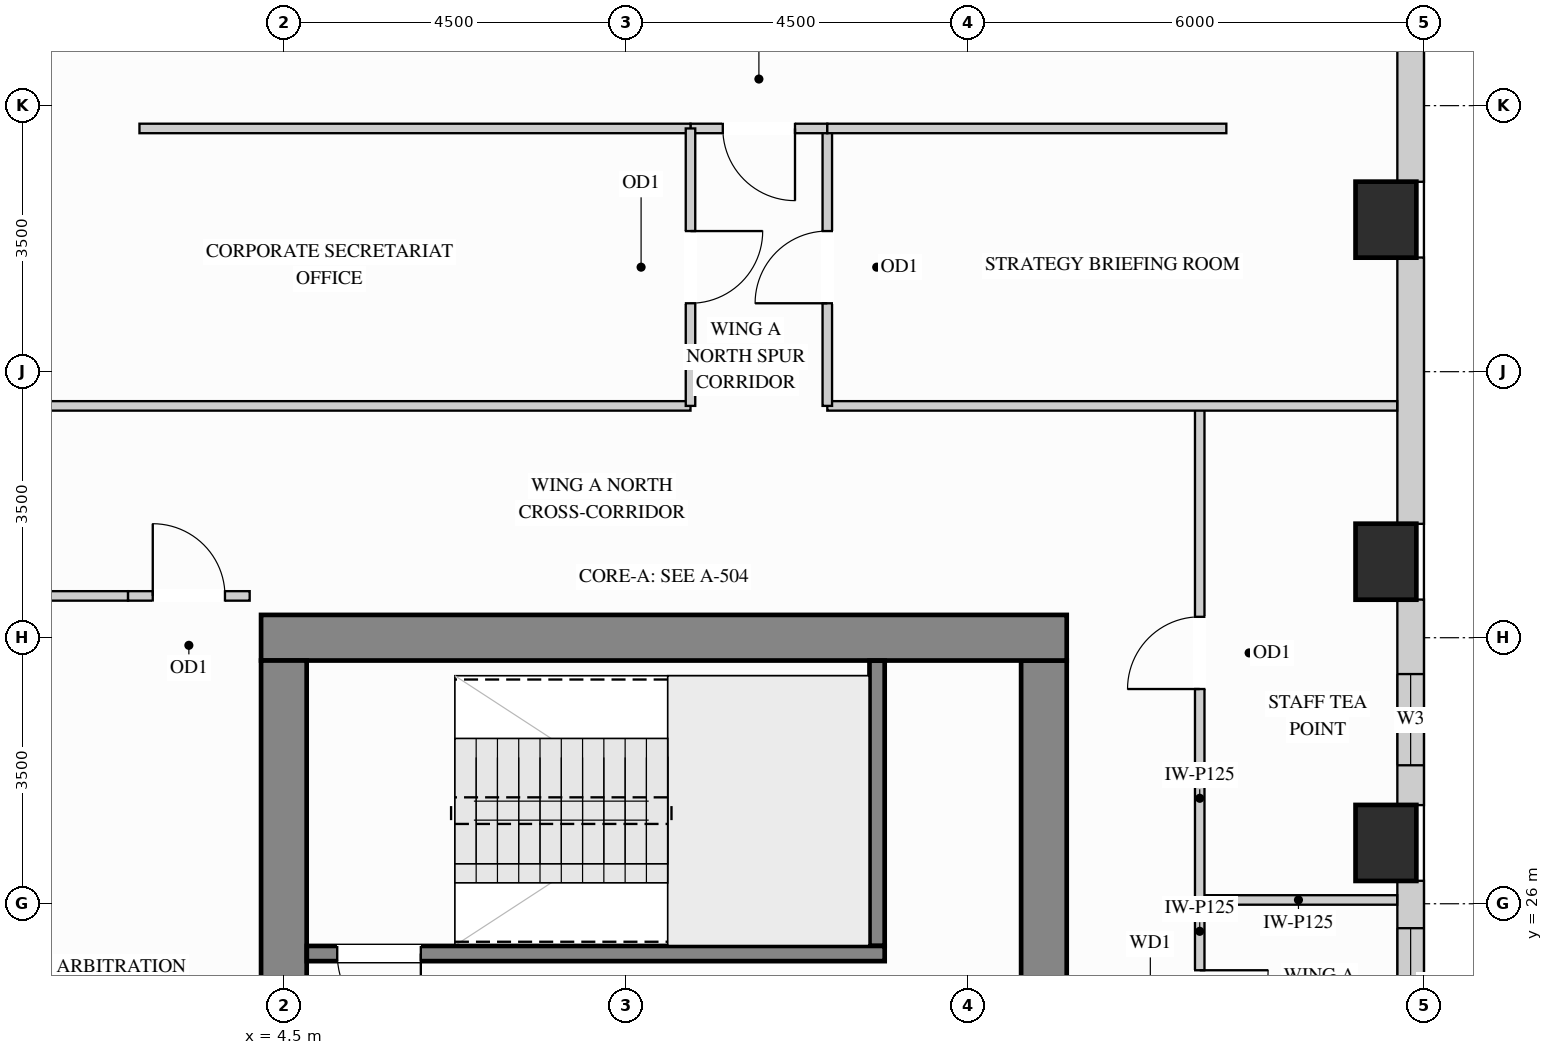
"""IFC4 building model, lengths in metres.
Left out: names, types, materials, properties, quantities, classifications, styles, units other than length and angle.
Written with IfcOpenShell. Run it as: python <this file> out.ifc"""

import sys

from ifc_helpers import new_model, si_unit, direction, frame, frame_2d, origin, origin_2d, place, context, subcontext, project, spatial, rectangle, extrude, source, transform, mapped, element, fill, save


model = new_model("IFC4")
c1 = context("Model", 3, precision=1e-05, world=origin(), true_north=direction((0.0, 1.0)))
c2 = subcontext(c1, "Body", "Model", "MODEL_VIEW")
j1 = project(units=[si_unit("LENGTHUNIT", "METRE"), si_unit("PLANEANGLEUNIT", "RADIAN")], contexts=[c1])
p1 = place(None, origin())
s1 = spatial("IfcSite", under=j1, at=p1, CompositionType="ELEMENT")
p2 = place(p1, origin())
s2 = spatial("IfcBuilding", under=s1, at=p2, CompositionType="ELEMENT")
p3 = place(p2, frame((0.0, 0.0, 153.9)))
s3 = spatial("IfcBuildingStorey", under=s2, at=p3, CompositionType="ELEMENT", Elevation=153.9)
m1 = source(origin(), c2, "Body", "SweptSolid", [
    extrude(rectangle(XDim=0.8, YDim=1.0, at=origin_2d()), origin(), (0.0, 0.0, 1.0), 3.4),
])
for number, where, z_axis, x_axis in (
    (1, (19.0, 26.8, 0.0), (0.0, 0.0, 1.0), (1.0, 0.0, 0.0)),
    (2, (19.0, 30.5, 0.0), (0.0, 0.0, 1.0), (1.0, 0.0, 0.0)),
    (3, (19.0, 35.0, 0.0), (0.0, 0.0, 1.0), (1.0, 0.0, 0.0)),
):
    element("IfcColumn", number, at=place(p3, frame(where, z_axis=z_axis, x_axis=x_axis)), inside=s3, PredefinedType="COLUMN", context=c2, shape_type="MappedRepresentation", body=[
        mapped(m1, transform((0.0, 0.0, 0.0), x_axis=(1.0, 0.0, 0.0), y_axis=(0.0, 1.0, 0.0), z_axis=(0.0, 0.0, 1.0))),
    ])
m2 = source(origin(), c2, "Body", "SweptSolid", [
    extrude(rectangle(XDim=8.32, YDim=0.6, at=frame_2d((4.16, 0.0))), origin(), (0.0, 0.0, 1.0), 3.4),
])
p4 = place(p3, frame((14.5, 20.88, 0.0), z_axis=(0.0, 0.0, 1.0), x_axis=(0.0, 1.0, 0.0)))
e4 = element("IfcWall", 4, at=p4, inside=s3, PredefinedType="SHEAR", context=c2, shape_type="MappedRepresentation", body=[
    mapped(m2, transform((0.0, 0.0, 0.0), x_axis=(1.0, 0.0, 0.0), y_axis=(0.0, 1.0, 0.0), z_axis=(0.0, 0.0, 1.0))),
])
m3 = source(origin(), c2, "Body", "SweptSolid", [
    extrude(rectangle(XDim=10.6, YDim=0.6, at=frame_2d((5.3, 0.0))), origin(), (0.0, 0.0, 1.0), 3.4),
])
p5 = place(p3, frame((4.2, 29.5, 0.0), z_axis=(0.0, 0.0, 1.0), x_axis=(1.0, 0.0, 0.0)))
e5 = element("IfcWall", 5, at=p5, inside=s3, PredefinedType="SHEAR", context=c2, shape_type="MappedRepresentation", body=[
    mapped(m3, transform((0.0, 0.0, 0.0), x_axis=(1.0, 0.0, 0.0), y_axis=(0.0, 1.0, 0.0), z_axis=(0.0, 0.0, 1.0))),
])
m4 = source(origin(), c2, "Body", "SweptSolid", [
    extrude(rectangle(XDim=20.4, YDim=0.6, at=frame_2d((10.2, 0.0))), origin(), (0.0, 0.0, 1.0), 3.4),
])
p6 = place(p3, frame((4.5, 8.8, 0.0), z_axis=(0.0, 0.0, 1.0), x_axis=(0.0, 1.0, 0.0)))
e6 = element("IfcWall", 6, at=p6, inside=s3, PredefinedType="SHEAR", context=c2, shape_type="MappedRepresentation", body=[
    mapped(m4, transform((0.0, 0.0, 0.0), x_axis=(1.0, 0.0, 0.0), y_axis=(0.0, 1.0, 0.0), z_axis=(0.0, 0.0, 1.0))),
])
p7 = place(p3, frame((19.325, 22.998, 0.0), z_axis=(0.0, 0.0, 1.0), x_axis=(0.0, 1.0, 0.0)))
e7 = element("IfcWall", 7, at=p7, inside=s3, PredefinedType="SOLIDWALL", context=c2, shape_type="SweptSolid", body=[
    extrude(rectangle(XDim=3.304, YDim=0.35, at=frame_2d((1.652, 0.0))), origin(), (0.0, 0.0, 1.0), 2.612),
])
p8 = place(p7, frame((1.18, 0.0, 0.78)))
e8 = element("IfcOpeningElement", 8, at=p8, cuts=e7, PredefinedType="OPENING", context=c2, shape_type="SweptSolid", body=[
    extrude(rectangle(XDim=1.5, YDim=1.652, at=frame_2d((0.75, 0.826))), frame((0.0, 0.185, 0.0), z_axis=(0.0, -1.0, 0.0), x_axis=(1.0, 0.0, 0.0)), (0.0, 0.0, 1.0), 0.37),
])
p9 = place(p3, frame((19.325, 27.298, 0.0), z_axis=(0.0, 0.0, 1.0), x_axis=(0.0, 1.0, 0.0)))
e9 = element("IfcWall", 9, at=p9, inside=s3, PredefinedType="SOLIDWALL", context=c2, shape_type="SweptSolid", body=[
    extrude(rectangle(XDim=2.704, YDim=0.35, at=frame_2d((1.352, 0.0))), origin(), (0.0, 0.0, 1.0), 2.612),
])
p10 = place(p9, frame((0.524, 0.0, 0.78)))
e10 = element("IfcOpeningElement", 10, at=p10, cuts=e9, PredefinedType="OPENING", context=c2, shape_type="SweptSolid", body=[
    extrude(rectangle(XDim=1.2, YDim=1.652, at=frame_2d((0.6, 0.826))), frame((0.0, 0.185, 0.0), z_axis=(0.0, -1.0, 0.0), x_axis=(1.0, 0.0, 0.0)), (0.0, 0.0, 1.0), 0.37),
])
m5 = source(origin(), c2, "Body", "SweptSolid", [
    extrude(rectangle(XDim=3.504, YDim=0.35, at=frame_2d((1.752, 0.0))), origin(), (0.0, 0.0, 1.0), 2.612),
])
p11 = place(p3, frame((19.325, 30.998, 0.0), z_axis=(0.0, 0.0, 1.0), x_axis=(0.0, 1.0, 0.0)))
e11 = element("IfcWall", 11, at=p11, inside=s3, PredefinedType="SOLIDWALL", context=c2, shape_type="MappedRepresentation", body=[
    mapped(m5, transform((0.0, 0.0, 0.0), x_axis=(1.0, 0.0, 0.0), y_axis=(0.0, 1.0, 0.0), z_axis=(0.0, 0.0, 1.0))),
])
m6 = source(origin(), c2, "Body", "SweptSolid", [
    extrude(rectangle(XDim=1.904, YDim=0.35, at=frame_2d((0.952, 0.0))), origin(), (0.0, 0.0, 1.0), 2.612),
])
p12 = place(p3, frame((19.325, 35.498, 0.0), z_axis=(0.0, 0.0, 1.0), x_axis=(0.0, 1.0, 0.0)))
e12 = element("IfcWall", 12, at=p12, inside=s3, PredefinedType="SOLIDWALL", context=c2, shape_type="MappedRepresentation", body=[
    mapped(m6, transform((0.0, 0.0, 0.0), x_axis=(1.0, 0.0, 0.0), y_axis=(0.0, 1.0, 0.0), z_axis=(0.0, 0.0, 1.0))),
])
m7 = source(origin(), c2, "Body", "SweptSolid", [
    extrude(rectangle(XDim=2.598, YDim=0.125, at=frame_2d((1.299, 0.0))), origin(), (0.0, 0.0, 1.0), 3.385),
])
p13 = place(p3, frame((16.55, 26.05, 0.0), z_axis=(0.0, 0.0, 1.0), x_axis=(1.0, 0.0, 0.0)))
e13 = element("IfcWall", 13, at=p13, inside=s3, PredefinedType="PARTITIONING", context=c2, shape_type="MappedRepresentation", body=[
    mapped(m7, transform((0.0, 0.0, 0.0), x_axis=(1.0, 0.0, 0.0), y_axis=(0.0, 1.0, 0.0), z_axis=(0.0, 0.0, 1.0))),
])
p14 = place(p3, frame((16.55, 26.05, 0.0), z_axis=(0.0, 0.0, 1.0), x_axis=(0.0, 1.0, 0.0)))
e14 = element("IfcWall", 14, at=p14, inside=s3, PredefinedType="PARTITIONING", context=c2, shape_type="SweptSolid", body=[
    extrude(rectangle(XDim=6.5, YDim=0.125, at=frame_2d((3.25, 0.0))), origin(), (0.0, 0.0, 1.0), 3.385),
])
p15 = place(p14, frame((2.775, 0.0, 0.0)))
e15 = element("IfcOpeningElement", 15, at=p15, cuts=e14, PredefinedType="OPENING", context=c2, shape_type="SweptSolid", body=[
    extrude(rectangle(XDim=0.95, YDim=2.15, at=frame_2d((0.475, 1.075))), frame((0.0, 0.073, 0.0), z_axis=(0.0, -1.0, 0.0), x_axis=(1.0, 0.0, 0.0)), (0.0, 0.0, 1.0), 0.145),
])
p16 = place(p3, frame((16.55, 23.35, 0.0), z_axis=(0.0, 0.0, 1.0), x_axis=(0.0, 1.0, 0.0)))
e16 = element("IfcWall", 16, at=p16, inside=s3, PredefinedType="PARTITIONING", context=c2, shape_type="SweptSolid", body=[
    extrude(rectangle(XDim=2.7, YDim=0.125, at=frame_2d((1.35, 0.0))), origin(), (0.0, 0.0, 1.0), 3.385),
])
p17 = place(p16, frame((0.875, 0.0, 0.0)))
e17 = element("IfcOpeningElement", 17, at=p17, cuts=e16, PredefinedType="OPENING", context=c2, shape_type="SweptSolid", body=[
    extrude(rectangle(XDim=0.9, YDim=2.15, at=frame_2d((0.45, 1.075))), frame((0.0, 0.073, 0.0), z_axis=(0.0, -1.0, 0.0), x_axis=(1.0, 0.0, 0.0)), (0.0, 0.0, 1.0), 0.145),
])
m8 = source(origin(), c2, "Body", "SweptSolid", [
    extrude(rectangle(XDim=7.498, YDim=0.125, at=frame_2d((3.749, 0.0))), origin(), (0.0, 0.0, 1.0), 3.385),
])
p18 = place(p3, frame((11.65, 32.55, 0.0), z_axis=(0.0, 0.0, 1.0), x_axis=(1.0, 0.0, 0.0)))
e18 = element("IfcWall", 18, at=p18, inside=s3, PredefinedType="PARTITIONING", context=c2, shape_type="MappedRepresentation", body=[
    mapped(m8, transform((0.0, 0.0, 0.0), x_axis=(1.0, 0.0, 0.0), y_axis=(0.0, 1.0, 0.0), z_axis=(0.0, 0.0, 1.0))),
])
m9 = source(origin(), c2, "Body", "SweptSolid", [
    extrude(rectangle(XDim=9.498, YDim=0.125, at=frame_2d((4.749, 0.0))), origin(), (0.0, 0.0, 1.0), 3.385),
])
p19 = place(p3, frame((0.352, 32.55, 0.0), z_axis=(0.0, 0.0, 1.0), x_axis=(1.0, 0.0, 0.0)))
e19 = element("IfcWall", 19, at=p19, inside=s3, PredefinedType="PARTITIONING", context=c2, shape_type="MappedRepresentation", body=[
    mapped(m9, transform((0.0, 0.0, 0.0), x_axis=(1.0, 0.0, 0.0), y_axis=(0.0, 1.0, 0.0), z_axis=(0.0, 0.0, 1.0))),
])
m10 = source(origin(), c2, "Body", "SweptSolid", [
    extrude(rectangle(XDim=1.33, YDim=0.125, at=frame_2d((0.665, 0.0))), origin(), (0.0, 0.0, 1.0), 3.385),
])
p20 = place(p3, frame((1.12, 30.05, 0.0), z_axis=(0.0, 0.0, 1.0), x_axis=(1.0, 0.0, 0.0)))
e20 = element("IfcWall", 20, at=p20, inside=s3, PredefinedType="PARTITIONING", context=c2, shape_type="MappedRepresentation", body=[
    mapped(m10, transform((0.0, 0.0, 0.0), x_axis=(1.0, 0.0, 0.0), y_axis=(0.0, 1.0, 0.0), z_axis=(0.0, 0.0, 1.0))),
])
p21 = place(p3, frame((2.45, 30.05, 0.0), z_axis=(0.0, 0.0, 1.0), x_axis=(1.0, 0.0, 0.0)))
e21 = element("IfcWall", 21, at=p21, inside=s3, PredefinedType="PARTITIONING", context=c2, shape_type="SweptSolid", body=[
    extrude(rectangle(XDim=1.6, YDim=0.125, at=frame_2d((0.8, 0.0))), origin(), (0.0, 0.0, 1.0), 3.385),
])
p22 = place(p21, frame((0.325, 0.0, 0.0)))
e22 = element("IfcOpeningElement", 22, at=p22, cuts=e21, PredefinedType="OPENING", context=c2, shape_type="SweptSolid", body=[
    extrude(rectangle(XDim=0.95, YDim=2.15, at=frame_2d((0.475, 1.075))), frame((0.0, 0.073, 0.0), z_axis=(0.0, -1.0, 0.0), x_axis=(1.0, 0.0, 0.0)), (0.0, 0.0, 1.0), 0.145),
])
p23 = place(p3, frame((11.65, 32.55, 0.0), z_axis=(0.0, 0.0, 1.0), x_axis=(0.0, 1.0, 0.0)))
e23 = element("IfcWall", 23, at=p23, inside=s3, PredefinedType="PARTITIONING", context=c2, shape_type="SweptSolid", body=[
    extrude(rectangle(XDim=3.65, YDim=0.125, at=frame_2d((1.825, 0.0))), origin(), (0.0, 0.0, 1.0), 3.385),
])
p24 = place(p23, frame((1.35, 0.0, 0.0)))
e24 = element("IfcOpeningElement", 24, at=p24, cuts=e23, PredefinedType="OPENING", context=c2, shape_type="SweptSolid", body=[
    extrude(rectangle(XDim=0.95, YDim=2.15, at=frame_2d((0.475, 1.075))), frame((0.0, 0.073, 0.0), z_axis=(0.0, -1.0, 0.0), x_axis=(1.0, 0.0, 0.0)), (0.0, 0.0, 1.0), 0.145),
])
p25 = place(p3, frame((9.85, 36.2, 0.0), z_axis=(0.0, 0.0, 1.0), x_axis=(1.0, 0.0, 0.0)))
e25 = element("IfcWall", 25, at=p25, inside=s3, PredefinedType="PARTITIONING", context=c2, shape_type="SweptSolid", body=[
    extrude(rectangle(XDim=1.8, YDim=0.125, at=frame_2d((0.9, 0.0))), origin(), (0.0, 0.0, 1.0), 2.848),
])
p26 = place(p25, frame((0.425, 0.0, 0.0)))
e26 = element("IfcOpeningElement", 26, at=p26, cuts=e25, PredefinedType="OPENING", context=c2, shape_type="SweptSolid", body=[
    extrude(rectangle(XDim=0.95, YDim=2.15, at=frame_2d((0.475, 1.075))), frame((0.0, 0.073, 0.0), z_axis=(0.0, -1.0, 0.0), x_axis=(1.0, 0.0, 0.0)), (0.0, 0.0, 1.0), 0.145),
])
m11 = source(origin(), c2, "Body", "SweptSolid", [
    extrude(rectangle(XDim=5.25, YDim=0.125, at=frame_2d((2.625, 0.0))), origin(), (0.0, 0.0, 1.0), 2.848),
])
p27 = place(p3, frame((11.65, 36.2, 0.0), z_axis=(0.0, 0.0, 1.0), x_axis=(1.0, 0.0, 0.0)))
e27 = element("IfcWall", 27, at=p27, inside=s3, PredefinedType="PARTITIONING", context=c2, shape_type="MappedRepresentation", body=[
    mapped(m11, transform((0.0, 0.0, 0.0), x_axis=(1.0, 0.0, 0.0), y_axis=(0.0, 1.0, 0.0), z_axis=(0.0, 0.0, 1.0))),
])
m12 = source(origin(), c2, "Body", "SweptSolid", [
    extrude(rectangle(XDim=7.25, YDim=0.125, at=frame_2d((3.625, 0.0))), origin(), (0.0, 0.0, 1.0), 2.848),
])
p28 = place(p3, frame((2.6, 36.2, 0.0), z_axis=(0.0, 0.0, 1.0), x_axis=(1.0, 0.0, 0.0)))
e28 = element("IfcWall", 28, at=p28, inside=s3, PredefinedType="PARTITIONING", context=c2, shape_type="MappedRepresentation", body=[
    mapped(m12, transform((0.0, 0.0, 0.0), x_axis=(1.0, 0.0, 0.0), y_axis=(0.0, 1.0, 0.0), z_axis=(0.0, 0.0, 1.0))),
])
p29 = place(p3, frame((9.85, 32.55, 0.0), z_axis=(0.0, 0.0, 1.0), x_axis=(0.0, 1.0, 0.0)))
e29 = element("IfcWall", 29, at=p29, inside=s3, PredefinedType="PARTITIONING", context=c2, shape_type="SweptSolid", body=[
    extrude(rectangle(XDim=3.65, YDim=0.125, at=frame_2d((1.825, 0.0))), origin(), (0.0, 0.0, 1.0), 3.385),
])
p30 = place(p29, frame((1.35, 0.0, 0.0)))
e30 = element("IfcOpeningElement", 30, at=p30, cuts=e29, PredefinedType="OPENING", context=c2, shape_type="SweptSolid", body=[
    extrude(rectangle(XDim=0.95, YDim=2.15, at=frame_2d((0.475, 1.075))), frame((0.0, 0.073, 0.0), z_axis=(0.0, -1.0, 0.0), x_axis=(1.0, 0.0, 0.0)), (0.0, 0.0, 1.0), 0.145),
])
m13 = source(origin(), c2, "Body", "SweptSolid", [
    extrude(rectangle(XDim=3.753, YDim=0.2, at=frame_2d((1.876, 0.0))), origin(), (0.0, 0.0, 1.0), 3.4),
])
p31 = place(p3, frame((12.305, 25.445, 0.0), z_axis=(0.0, 0.0, 1.0), x_axis=(0.0, 1.0, 0.0)))
e31 = element("IfcWall", 31, at=p31, inside=s3, PredefinedType="SHEAR", context=c2, shape_type="MappedRepresentation", body=[
    mapped(m13, transform((0.0, 0.0, 0.0), x_axis=(1.0, 0.0, 0.0), y_axis=(0.0, 1.0, 0.0), z_axis=(0.0, 0.0, 1.0))),
])
p32 = place(p3, frame((4.802, 25.345, 0.0), z_axis=(0.0, 0.0, 1.0), x_axis=(1.0, 0.0, 0.0)))
e32 = element("IfcWall", 32, at=p32, inside=s3, PredefinedType="SHEAR", context=c2, shape_type="SweptSolid", body=[
    extrude(rectangle(XDim=7.603, YDim=0.2, at=frame_2d((3.802, 0.0))), origin(), (0.0, 0.0, 1.0), 3.4),
])
p33 = place(p32, frame((0.4, 0.0, 0.0)))
e33 = element("IfcOpeningElement", 33, at=p33, cuts=e32, PredefinedType="OPENING", context=c2, shape_type="SweptSolid", body=[
    extrude(rectangle(XDim=1.1, YDim=2.15, at=frame_2d((0.55, 1.075))), frame((0.0, 0.11, 0.0), z_axis=(0.0, -1.0, 0.0), x_axis=(1.0, 0.0, 0.0)), (0.0, 0.0, 1.0), 0.22),
])
m14 = source(origin(), c2, "Body", "SweptSolid", [
    extrude(rectangle(XDim=0.95, YDim=2.15, at=frame_2d((0.475, 1.075))), frame((0.0, 0.025, 0.0), z_axis=(0.0, -1.0, 0.0), x_axis=(1.0, 0.0, 0.0)), (0.0, 0.0, 1.0), 0.05),
])
p34 = place(p15, origin())
e34 = element("IfcDoor", 34, at=p34, inside=s3, OperationType="SINGLE_SWING_LEFT", PredefinedType="DOOR", context=c2, shape_type="MappedRepresentation", body=[
    mapped(m14, transform((0.0, 0.0, 0.0), x_axis=(1.0, 0.0, 0.0), y_axis=(0.0, 1.0, 0.0), z_axis=(0.0, 0.0, 1.0))),
])
fill(e15, e34)
p35 = place(p24, origin())
e35 = element("IfcDoor", 35, at=p35, inside=s3, OperationType="SINGLE_SWING_LEFT", PredefinedType="DOOR", context=c2, shape_type="MappedRepresentation", body=[
    mapped(m14, transform((0.0, 0.0, 0.0), x_axis=(1.0, 0.0, 0.0), y_axis=(0.0, 1.0, 0.0), z_axis=(0.0, 0.0, 1.0))),
])
fill(e24, e35)
p36 = place(p26, origin())
e36 = element("IfcDoor", 36, at=p36, inside=s3, OperationType="SINGLE_SWING_RIGHT", PredefinedType="DOOR", context=c2, shape_type="MappedRepresentation", body=[
    mapped(m14, transform((0.0, 0.0, 0.0), x_axis=(1.0, 0.0, 0.0), y_axis=(0.0, 1.0, 0.0), z_axis=(0.0, 0.0, 1.0))),
])
fill(e26, e36)
p37 = place(p30, origin())
e37 = element("IfcDoor", 37, at=p37, inside=s3, OperationType="SINGLE_SWING_RIGHT", PredefinedType="DOOR", context=c2, shape_type="MappedRepresentation", body=[
    mapped(m14, transform((0.0, 0.0, 0.0), x_axis=(1.0, 0.0, 0.0), y_axis=(0.0, 1.0, 0.0), z_axis=(0.0, 0.0, 1.0))),
])
fill(e30, e37)
p38 = place(p22, origin())
e38 = element("IfcDoor", 38, at=p38, inside=s3, OperationType="SINGLE_SWING_LEFT", PredefinedType="DOOR", context=c2, shape_type="MappedRepresentation", body=[
    mapped(m14, transform((0.0, 0.0, 0.0), x_axis=(1.0, 0.0, 0.0), y_axis=(0.0, 1.0, 0.0), z_axis=(0.0, 0.0, 1.0))),
])
fill(e22, e38)
m15 = source(origin(), c2, "Body", "SweptSolid", [
    extrude(rectangle(XDim=1.1, YDim=2.15, at=frame_2d((0.55, 1.075))), frame((0.0, 0.025, 0.0), z_axis=(0.0, -1.0, 0.0), x_axis=(1.0, 0.0, 0.0)), (0.0, 0.0, 1.0), 0.05),
])
p39 = place(p33, origin())
e39 = element("IfcDoor", 39, at=p39, inside=s3, OperationType="SINGLE_SWING_RIGHT", PredefinedType="DOOR", context=c2, shape_type="MappedRepresentation", body=[
    mapped(m15, transform((0.0, 0.0, 0.0), x_axis=(1.0, 0.0, 0.0), y_axis=(0.0, 1.0, 0.0), z_axis=(0.0, 0.0, 1.0))),
])
fill(e33, e39)
m16 = source(origin(), c2, "Body", "SweptSolid", [
    extrude(rectangle(XDim=0.9, YDim=2.15, at=frame_2d((0.45, 1.075))), frame((0.0, 0.025, 0.0), z_axis=(0.0, -1.0, 0.0), x_axis=(1.0, 0.0, 0.0)), (0.0, 0.0, 1.0), 0.05),
])
p40 = place(p17, origin())
e40 = element("IfcDoor", 40, at=p40, inside=s3, OperationType="SINGLE_SWING_RIGHT", PredefinedType="DOOR", context=c2, shape_type="MappedRepresentation", body=[
    mapped(m16, transform((0.0, 0.0, 0.0), x_axis=(1.0, 0.0, 0.0), y_axis=(0.0, 1.0, 0.0), z_axis=(0.0, 0.0, 1.0))),
])
fill(e17, e40)
m17 = source(origin(), c2, "Body", "SweptSolid", [
    extrude(rectangle(XDim=1.2, YDim=1.652, at=frame_2d((0.6, 0.826))), frame((0.0, 0.03, 0.0), z_axis=(0.0, -1.0, 0.0), x_axis=(1.0, 0.0, 0.0)), (0.0, 0.0, 1.0), 0.06),
])
p41 = place(p10, origin())
e41 = element("IfcWindow", 41, at=p41, inside=s3, PartitioningType="SINGLE_PANEL", PredefinedType="WINDOW", context=c2, shape_type="MappedRepresentation", body=[
    mapped(m17, transform((0.0, 0.0, 0.0), x_axis=(1.0, 0.0, 0.0), y_axis=(0.0, 1.0, 0.0), z_axis=(0.0, 0.0, 1.0))),
])
fill(e10, e41)
m18 = source(origin(), c2, "Body", "SweptSolid", [
    extrude(rectangle(XDim=1.5, YDim=1.652, at=frame_2d((0.75, 0.826))), frame((0.0, 0.03, 0.0), z_axis=(0.0, -1.0, 0.0), x_axis=(1.0, 0.0, 0.0)), (0.0, 0.0, 1.0), 0.06),
])
p42 = place(p8, origin())
e42 = element("IfcWindow", 42, at=p42, inside=s3, PartitioningType="SINGLE_PANEL", PredefinedType="WINDOW", context=c2, shape_type="MappedRepresentation", body=[
    mapped(m18, transform((0.0, 0.0, 0.0), x_axis=(1.0, 0.0, 0.0), y_axis=(0.0, 1.0, 0.0), z_axis=(0.0, 0.0, 1.0))),
])
fill(e8, e42)
save(model, sys.argv[1])
